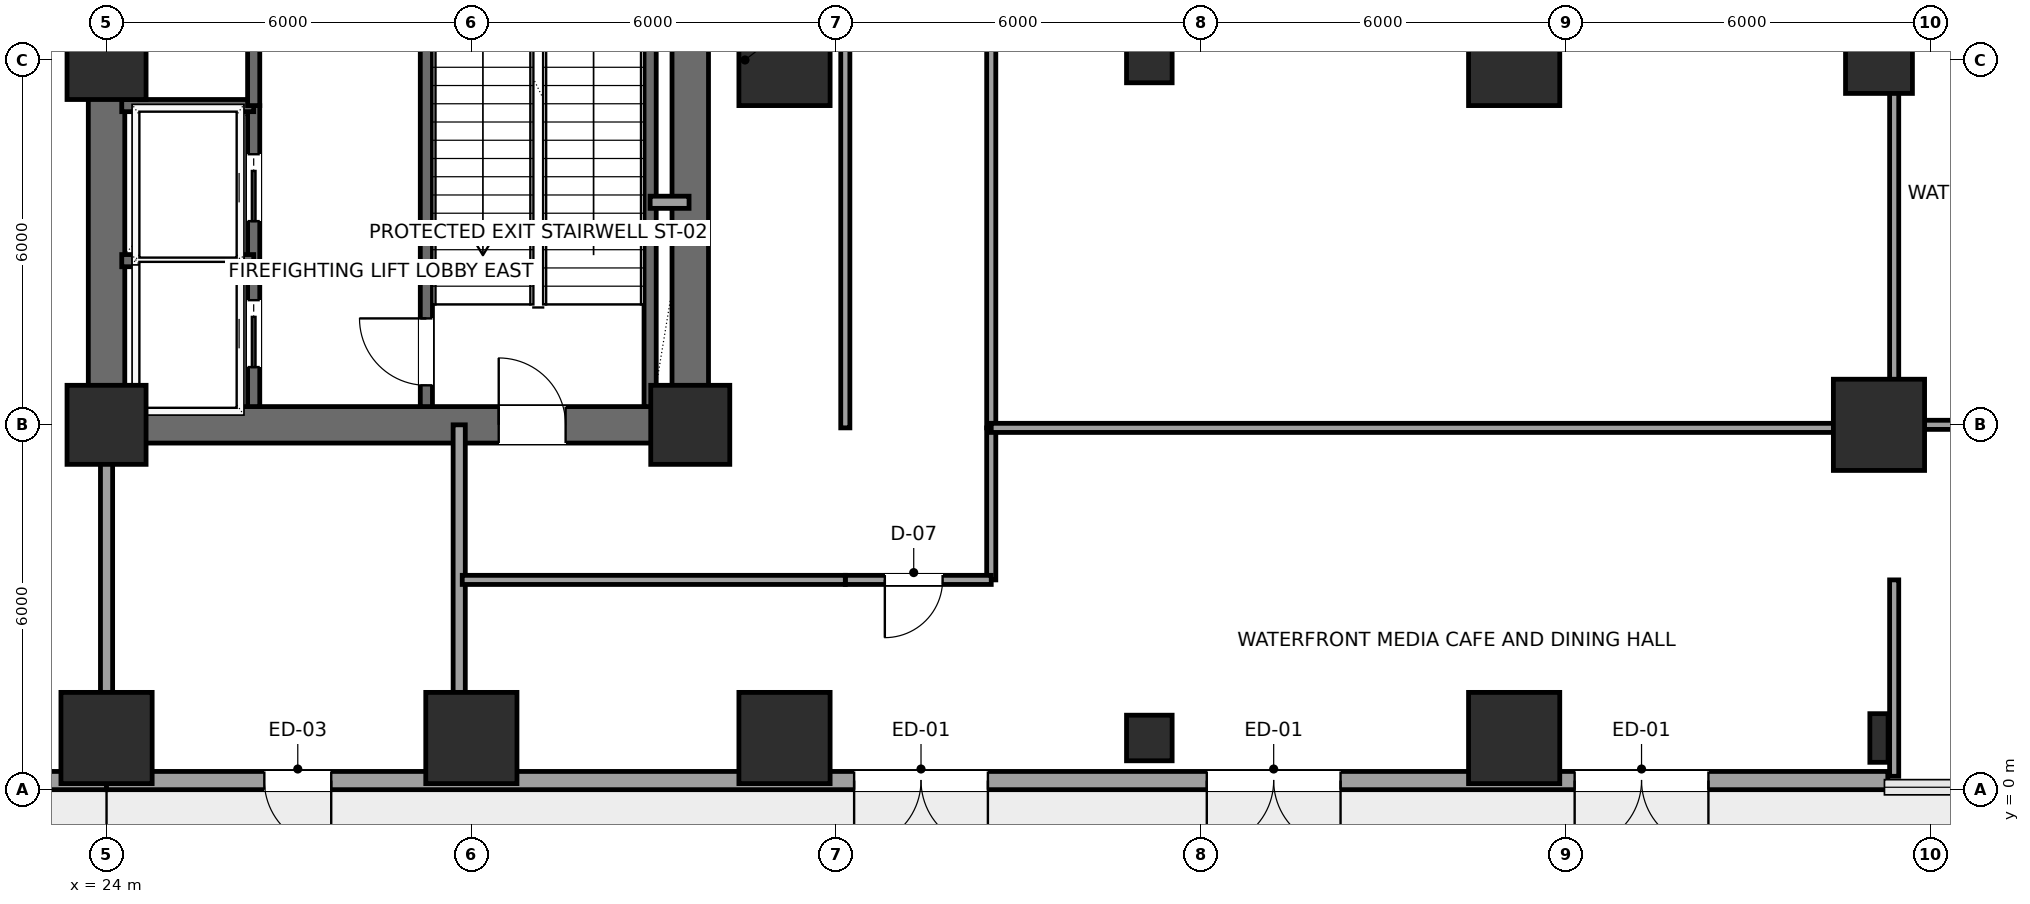
"""IFC4 building model, lengths in metres.
Left out: names, types, materials, properties, quantities, classifications, styles, units other than length and angle.
Written with IfcOpenShell. Run it as: python <this file> out.ifc"""

import sys

from ifc_helpers import new_model, si_unit, direction, frame, frame_2d, origin, origin_2d, place, context, subcontext, project, spatial, rectangle, hollow_rectangle, i_section, extrude, element, fill, save


model = new_model("IFC4")
c1 = context("Model", 3, precision=1e-05, world=origin(), true_north=direction((0.0, 1.0)))
c2 = subcontext(c1, "Body", "Model", "MODEL_VIEW")
j1 = project(units=[si_unit("LENGTHUNIT", "METRE"), si_unit("PLANEANGLEUNIT", "RADIAN")], contexts=[c1])
p1 = place(None, origin())
s1 = spatial("IfcSite", under=j1, at=p1, CompositionType="ELEMENT")
p2 = place(p1, origin())
s2 = spatial("IfcBuilding", under=s1, at=p2, CompositionType="ELEMENT")
p3 = place(p2, origin())
s3 = spatial("IfcBuildingStorey", under=s2, at=p3, CompositionType="ELEMENT", Elevation=0.0)
for number, where, z_axis, x_axis in (
    (1, (24.0, 6.0, 0.0), (0.0, 0.0, 1.0), (1.0, 0.0, 0.0)),
    (2, (24.0, 12.0, 0.0), (0.0, 0.0, 1.0), (1.0, 0.0, 0.0)),
    (3, (33.6, 6.0, 0.0), (0.0, 0.0, 1.0), (1.0, 0.0, 0.0)),
):
    element("IfcColumn", number, at=place(p3, frame(where, z_axis=z_axis, x_axis=x_axis)), inside=s3, PredefinedType="COLUMN", context=c2, shape_type="SweptSolid", body=[
        extrude(rectangle(XDim=1.3, YDim=1.3, at=origin_2d()), origin(), (0.0, 0.0, 1.0), 5.7),
    ])
for number, where, z_axis, x_axis in (
    (4, (24.0, 0.85, 0.0), (0.0, 0.0, 1.0), (1.0, 0.0, 0.0)),
    (5, (30.0, 0.85, 0.0), (0.0, 0.0, 1.0), (1.0, 0.0, 0.0)),
    (6, (35.15, 0.85, 0.0), (0.0, 0.0, 1.0), (1.0, 0.0, 0.0)),
    (7, (35.15, 12.0, 0.0), (0.0, 0.0, 1.0), (1.0, 0.0, 0.0)),
):
    element("IfcColumn", number, at=place(p3, frame(where, z_axis=z_axis, x_axis=x_axis)), inside=s3, PredefinedType="COLUMN", context=c2, shape_type="SweptSolid", body=[
        extrude(rectangle(XDim=1.5, YDim=1.5, at=origin_2d()), origin(), (0.0, 0.0, 1.0), 5.7),
    ])
for number, where, z_axis, x_axis in (
    (8, (41.15, 0.85, 0.0), (0.0, 0.0, 1.0), (1.0, 0.0, 0.0)),
    (9, (41.15, 12.0, 0.0), (0.0, 0.0, 1.0), (1.0, 0.0, 0.0)),
):
    element("IfcColumn", number, at=place(p3, frame(where, z_axis=z_axis, x_axis=x_axis)), inside=s3, PredefinedType="COLUMN", context=c2, shape_type="SweptSolid", body=[
        extrude(hollow_rectangle(XDim=0.75, YDim=0.75, WallThickness=0.035, InnerFilletRadius=0.035, OuterFilletRadius=0.05, at=origin_2d()), origin(), (0.0, 0.0, 1.0), 5.7),
    ])
for number, where, z_axis, x_axis in (
    (10, (47.15, 0.85, 0.0), (0.0, 0.0, 1.0), (1.0, 0.0, 0.0)),
    (11, (47.15, 12.0, 0.0), (0.0, 0.0, 1.0), (1.0, 0.0, 0.0)),
):
    element("IfcColumn", number, at=place(p3, frame(where, z_axis=z_axis, x_axis=x_axis)), inside=s3, PredefinedType="COLUMN", context=c2, shape_type="SweptSolid", body=[
        extrude(rectangle(XDim=1.5, YDim=1.5, at=origin_2d()), origin(), (0.0, 0.0, 1.0), 5.7),
    ])
p4 = place(p3, frame((53.15, 0.85, 0.0), z_axis=(0.0, 0.0, 1.0), x_axis=(1.0, 0.0, 0.0)))
e12 = element("IfcColumn", 12, at=p4, inside=s3, PredefinedType="COLUMN", context=c2, shape_type="SweptSolid", body=[
    extrude(i_section(OverallWidth=0.3, OverallDepth=0.8, WebThickness=0.018, FlangeThickness=0.033, FilletRadius=0.03, at=origin_2d()), origin(), (0.0, 0.0, 1.0), 5.7),
])
p5 = place(p3, frame((53.15, 6.0, 0.0), z_axis=(0.0, 0.0, 1.0), x_axis=(1.0, 0.0, 0.0)))
e13 = element("IfcColumn", 13, at=p5, inside=s3, PredefinedType="COLUMN", context=c2, shape_type="SweptSolid", body=[
    extrude(rectangle(XDim=1.5, YDim=1.5, at=origin_2d()), origin(), (0.0, 0.0, 1.0), 5.7),
])
p6 = place(p3, frame((53.15, 12.0, 0.0), z_axis=(0.0, 0.0, 1.0), x_axis=(1.0, 0.0, 0.0)))
e14 = element("IfcColumn", 14, at=p6, inside=s3, PredefinedType="COLUMN", context=c2, shape_type="SweptSolid", body=[
    extrude(rectangle(XDim=1.1, YDim=1.1, at=origin_2d()), origin(), (0.0, 0.0, 1.0), 5.7),
])
p7 = place(p3, frame((24.0, 0.15, 0.0), z_axis=(0.0, 0.0, 1.0), x_axis=(-1.0, 0.0, 0.0)))
e15 = element("IfcWall", 15, at=p7, inside=s3, PredefinedType="SOLIDWALL", context=c2, shape_type="SweptSolid", body=[
    extrude(rectangle(XDim=12.145, YDim=0.3, at=frame_2d((6.073, 0.0))), origin(), (0.0, 0.0, 1.0), 5.4),
])
p8 = place(p7, frame((1.9, 0.0, 0.0)))
e16 = element("IfcOpeningElement", 16, at=p8, cuts=e15, PredefinedType="OPENING", context=c2, shape_type="SweptSolid", body=[
    extrude(rectangle(XDim=2.2, YDim=2.6, at=frame_2d((1.1, 1.3))), frame((0.0, 0.16, 0.0), z_axis=(0.0, -1.0, 0.0), x_axis=(1.0, 0.0, 0.0)), (0.0, 0.0, 1.0), 0.32),
])
p9 = place(p7, frame((7.9, 0.0, 0.0)))
e17 = element("IfcOpeningElement", 17, at=p9, cuts=e15, PredefinedType="OPENING", context=c2, shape_type="SweptSolid", body=[
    extrude(rectangle(XDim=2.2, YDim=2.6, at=frame_2d((1.1, 1.3))), frame((0.0, 0.16, 0.0), z_axis=(0.0, -1.0, 0.0), x_axis=(1.0, 0.0, 0.0)), (0.0, 0.0, 1.0), 0.32),
])
p10 = place(p3, frame((53.295, 0.15, 0.0), z_axis=(0.0, 0.0, 1.0), x_axis=(-1.0, 0.0, 0.0)))
e18 = element("IfcWall", 18, at=p10, inside=s3, PredefinedType="SOLIDWALL", context=c2, shape_type="SweptSolid", body=[
    extrude(rectangle(XDim=29.295, YDim=0.3, at=frame_2d((14.647, 0.0))), origin(), (0.0, 0.0, 1.0), 5.4),
])
p11 = place(p10, frame((2.95, 0.0, 0.0)))
e19 = element("IfcOpeningElement", 19, at=p11, cuts=e18, PredefinedType="OPENING", context=c2, shape_type="SweptSolid", body=[
    extrude(rectangle(XDim=2.2, YDim=2.6, at=frame_2d((1.1, 1.3))), frame((0.0, 0.16, 0.0), z_axis=(0.0, -1.0, 0.0), x_axis=(1.0, 0.0, 0.0)), (0.0, 0.0, 1.0), 0.32),
])
p12 = place(p10, frame((9.0, 0.0, 0.0)))
e20 = element("IfcOpeningElement", 20, at=p12, cuts=e18, PredefinedType="OPENING", context=c2, shape_type="SweptSolid", body=[
    extrude(rectangle(XDim=2.2, YDim=2.6, at=frame_2d((1.1, 1.3))), frame((0.0, 0.16, 0.0), z_axis=(0.0, -1.0, 0.0), x_axis=(1.0, 0.0, 0.0)), (0.0, 0.0, 1.0), 0.32),
])
p13 = place(p10, frame((14.8, 0.0, 0.0)))
e21 = element("IfcOpeningElement", 21, at=p13, cuts=e18, PredefinedType="OPENING", context=c2, shape_type="SweptSolid", body=[
    extrude(rectangle(XDim=2.2, YDim=2.6, at=frame_2d((1.1, 1.3))), frame((0.0, 0.16, 0.0), z_axis=(0.0, -1.0, 0.0), x_axis=(1.0, 0.0, 0.0)), (0.0, 0.0, 1.0), 0.32),
])
p14 = place(p10, frame((25.6, 0.0, 0.0)))
e22 = element("IfcOpeningElement", 22, at=p14, cuts=e18, PredefinedType="OPENING", context=c2, shape_type="SweptSolid", body=[
    extrude(rectangle(XDim=1.1, YDim=2.2, at=frame_2d((0.55, 1.1))), frame((0.0, 0.16, 0.0), z_axis=(0.0, -1.0, 0.0), x_axis=(1.0, 0.0, 0.0)), (0.0, 0.0, 1.0), 0.32),
])
p15 = place(p3, frame((24.0, 6.0, 0.0), z_axis=(0.0, 0.0, 1.0), x_axis=(1.0, 0.0, 0.0)))
e23 = element("IfcWall", 23, at=p15, inside=s3, PredefinedType="SHEAR", context=c2, shape_type="SweptSolid", body=[
    extrude(rectangle(XDim=9.6, YDim=0.6, at=frame_2d((4.8, 0.0))), origin(), (0.0, 0.0, 1.0), 5.4),
])
p16 = place(p15, frame((6.45, 0.0, 0.0)))
e24 = element("IfcOpeningElement", 24, at=p16, cuts=e23, PredefinedType="OPENING", context=c2, shape_type="SweptSolid", body=[
    extrude(rectangle(XDim=1.1, YDim=2.2, at=frame_2d((0.55, 1.1))), frame((0.0, 0.31, 0.0), z_axis=(0.0, -1.0, 0.0), x_axis=(1.0, 0.0, 0.0)), (0.0, 0.0, 1.0), 0.62),
])
p17 = place(p3, frame((24.0, 6.0, 0.0), z_axis=(0.0, 0.0, 1.0), x_axis=(0.0, 1.0, 0.0)))
e25 = element("IfcWall", 25, at=p17, inside=s3, PredefinedType="SHEAR", context=c2, shape_type="SweptSolid", body=[
    extrude(rectangle(XDim=12.0, YDim=0.6, at=frame_2d((6.0, 0.0))), origin(), (0.0, 0.0, 1.0), 5.4),
])
p18 = place(p17, frame((7.15, 0.0, 0.0)))
e26 = element("IfcOpeningElement", 26, at=p18, cuts=e25, PredefinedType="OPENING", context=c2, shape_type="SweptSolid", body=[
    extrude(rectangle(XDim=1.6, YDim=2.3, at=frame_2d((0.8, 1.15))), frame((0.0, 0.31, 0.0), z_axis=(0.0, -1.0, 0.0), x_axis=(1.0, 0.0, 0.0)), (0.0, 0.0, 1.0), 0.62),
])
p19 = place(p3, frame((33.6, 6.0, 0.0), z_axis=(0.0, 0.0, 1.0), x_axis=(0.0, 1.0, 0.0)))
e27 = element("IfcWall", 27, at=p19, inside=s3, PredefinedType="SHEAR", context=c2, shape_type="SweptSolid", body=[
    extrude(rectangle(XDim=12.0, YDim=0.6, at=frame_2d((6.0, 0.0))), origin(), (0.0, 0.0, 1.0), 5.4),
])
p20 = place(p19, frame((10.2, 0.0, 0.0)))
e28 = element("IfcOpeningElement", 28, at=p20, cuts=e27, PredefinedType="OPENING", context=c2, shape_type="SweptSolid", body=[
    extrude(rectangle(XDim=0.9, YDim=2.15, at=frame_2d((0.45, 1.075))), frame((0.0, 0.31, 0.0), z_axis=(0.0, -1.0, 0.0), x_axis=(1.0, 0.0, 0.0)), (0.0, 0.0, 1.0), 0.62),
])
p21 = place(p3, frame((29.26, 6.3, 0.0), z_axis=(0.0, 0.0, 1.0), x_axis=(0.0, 1.0, 0.0)))
e29 = element("IfcWall", 29, at=p21, inside=s3, PredefinedType="SHEAR", context=c2, shape_type="SweptSolid", body=[
    extrude(rectangle(XDim=8.88, YDim=0.2, at=frame_2d((4.44, 0.0))), origin(), (0.0, 0.0, 1.0), 5.4),
])
p22 = place(p21, frame((0.35, 0.0, 0.0)))
e30 = element("IfcOpeningElement", 30, at=p22, cuts=e29, PredefinedType="OPENING", context=c2, shape_type="SweptSolid", body=[
    extrude(rectangle(XDim=1.1, YDim=2.2, at=frame_2d((0.55, 1.1))), frame((0.0, 0.11, 0.0), z_axis=(0.0, -1.0, 0.0), x_axis=(1.0, 0.0, 0.0)), (0.0, 0.0, 1.0), 0.22),
])
p23 = place(p3, frame((32.94, 6.3, 0.0), z_axis=(0.0, 0.0, 1.0), x_axis=(0.0, 1.0, 0.0)))
e31 = element("IfcWall", 31, at=p23, inside=s3, PredefinedType="SHEAR", context=c2, shape_type="SweptSolid", body=[
    extrude(rectangle(XDim=8.88, YDim=0.2, at=frame_2d((4.44, 0.0))), origin(), (0.0, 0.0, 1.0), 5.4),
])
p24 = place(p3, frame((26.42, 6.3, 0.0), z_axis=(0.0, 0.0, 1.0), x_axis=(0.0, 1.0, 0.0)))
e32 = element("IfcWall", 32, at=p24, inside=s3, PredefinedType="SHEAR", context=c2, shape_type="SweptSolid", body=[
    extrude(rectangle(XDim=4.95, YDim=0.2, at=frame_2d((2.475, 0.0))), origin(), (0.0, 0.0, 1.0), 5.4),
])
p25 = place(p24, frame((0.65, 0.0, 0.0)))
e33 = element("IfcOpeningElement", 33, at=p25, cuts=e32, PredefinedType="OPENING", context=c2, shape_type="SweptSolid", body=[
    extrude(rectangle(XDim=1.1, YDim=2.2, at=frame_2d((0.55, 1.1))), frame((0.0, 0.11, 0.0), z_axis=(0.0, -1.0, 0.0), x_axis=(1.0, 0.0, 0.0)), (0.0, 0.0, 1.0), 0.22),
])
p26 = place(p24, frame((3.05, 0.0, 0.0)))
e34 = element("IfcOpeningElement", 34, at=p26, cuts=e32, PredefinedType="OPENING", context=c2, shape_type="SweptSolid", body=[
    extrude(rectangle(XDim=1.1, YDim=2.2, at=frame_2d((0.55, 1.1))), frame((0.0, 0.11, 0.0), z_axis=(0.0, -1.0, 0.0), x_axis=(1.0, 0.0, 0.0)), (0.0, 0.0, 1.0), 0.22),
])
for number, where, z_axis, x_axis in (
    (35, (24.25, 8.7, 0.0), (0.0, 0.0, 1.0), (1.0, 0.0, 0.0)),
    (36, (24.25, 11.25, 0.0), (0.0, 0.0, 1.0), (1.0, 0.0, 0.0)),
):
    element("IfcWall", number, at=place(p3, frame(where, z_axis=z_axis, x_axis=x_axis)), inside=s3, PredefinedType="SHEAR", context=c2, shape_type="SweptSolid", body=[
        extrude(rectangle(XDim=2.17, YDim=0.2, at=frame_2d((1.085, 0.0))), origin(), (0.0, 0.0, 1.0), 5.4),
    ])
p27 = place(p3, frame((26.42, 11.25, 0.0), z_axis=(0.0, 0.0, 1.0), x_axis=(0.0, 1.0, 0.0)))
e37 = element("IfcWall", 37, at=p27, inside=s3, PredefinedType="SHEAR", context=c2, shape_type="SweptSolid", body=[
    extrude(rectangle(XDim=1.4, YDim=0.2, at=frame_2d((0.7, 0.0))), origin(), (0.0, 0.0, 1.0), 5.4),
])
p28 = place(p3, frame((32.94, 9.66, 0.0), z_axis=(0.0, 0.0, 1.0), x_axis=(1.0, 0.0, 0.0)))
e38 = element("IfcWall", 38, at=p28, inside=s3, PredefinedType="SOLIDWALL", context=c2, shape_type="SweptSolid", body=[
    extrude(rectangle(XDim=0.64, YDim=0.2, at=frame_2d((0.32, 0.0))), origin(), (0.0, 0.0, 1.0), 5.4),
])
p29 = place(p3, frame((24.0, 0.22, 0.0), z_axis=(0.0, 0.0, 1.0), x_axis=(0.0, 1.0, 0.0)))
e39 = element("IfcWall", 39, at=p29, inside=s3, PredefinedType="SOLIDWALL", context=c2, shape_type="SweptSolid", body=[
    extrude(rectangle(XDim=5.78, YDim=0.2, at=frame_2d((2.89, 0.0))), origin(), (0.0, 0.0, 1.0), 3.492),
])
p30 = place(p3, frame((29.8, 0.22, 0.0), z_axis=(0.0, 0.0, 1.0), x_axis=(0.0, 1.0, 0.0)))
e40 = element("IfcWall", 40, at=p30, inside=s3, PredefinedType="SOLIDWALL", context=c2, shape_type="SweptSolid", body=[
    extrude(rectangle(XDim=5.78, YDim=0.2, at=frame_2d((2.89, 0.0))), origin(), (0.0, 0.0, 1.0), 5.4),
])
p31 = place(p3, frame((36.15, 5.95, 0.0), z_axis=(0.0, 0.0, 1.0), x_axis=(0.0, 1.0, 0.0)))
e41 = element("IfcWall", 41, at=p31, inside=s3, PredefinedType="PARTITIONING", context=c2, shape_type="SweptSolid", body=[
    extrude(rectangle(XDim=9.93, YDim=0.15, at=frame_2d((4.965, 0.0))), origin(), (0.0, 0.0, 1.0), 5.4),
])
p32 = place(p3, frame((62.78, 6.0, 0.0), z_axis=(0.0, 0.0, 1.0), x_axis=(-1.0, 0.0, 0.0)))
e42 = element("IfcWall", 42, at=p32, inside=s3, PredefinedType="PARTITIONING", context=c2, shape_type="SweptSolid", body=[
    extrude(rectangle(XDim=9.38, YDim=0.15, at=frame_2d((4.69, 0.0))), origin(), (0.0, 0.0, 1.0), 5.4),
])
p33 = place(p3, frame((53.4, 6.0, 0.0), z_axis=(0.0, 0.0, 1.0), x_axis=(0.0, 1.0, 0.0)))
e43 = element("IfcWall", 43, at=p33, inside=s3, PredefinedType="PARTITIONING", context=c2, shape_type="SweptSolid", body=[
    extrude(rectangle(XDim=6.0, YDim=0.15, at=frame_2d((3.0, 0.0))), origin(), (0.0, 0.0, 1.0), 5.4),
])
p34 = place(p3, frame((53.4, 12.0, 0.0), z_axis=(0.0, 0.0, 1.0), x_axis=(0.0, 1.0, 0.0)))
e44 = element("IfcWall", 44, at=p34, inside=s3, PredefinedType="PARTITIONING", context=c2, shape_type="SweptSolid", body=[
    extrude(rectangle(XDim=1.65, YDim=0.15, at=frame_2d((0.825, 0.0))), origin(), (0.0, 0.0, 1.0), 5.4),
])
p35 = place(p3, frame((38.55, 23.64, 0.0), z_axis=(0.0, 0.0, 1.0), x_axis=(0.0, -1.0, 0.0)))
e45 = element("IfcWall", 45, at=p35, inside=s3, PredefinedType="PARTITIONING", context=c2, shape_type="SweptSolid", body=[
    extrude(rectangle(XDim=17.69, YDim=0.15, at=frame_2d((8.845, 0.0))), origin(), (0.0, 0.0, 1.0), 5.4),
])
p36 = place(p3, frame((38.55, 5.95, 0.0), z_axis=(0.0, 0.0, 1.0), x_axis=(0.0, -1.0, 0.0)))
e46 = element("IfcWall", 46, at=p36, inside=s3, PredefinedType="PARTITIONING", context=c2, shape_type="SweptSolid", body=[
    extrude(rectangle(XDim=2.5, YDim=0.15, at=frame_2d((1.25, 0.0))), origin(), (0.0, 0.0, 1.0), 5.4),
])
p37 = place(p3, frame((38.55, 3.45, 0.0), z_axis=(0.0, 0.0, 1.0), x_axis=(-1.0, 0.0, 0.0)))
e47 = element("IfcWall", 47, at=p37, inside=s3, PredefinedType="PARTITIONING", context=c2, shape_type="SweptSolid", body=[
    extrude(rectangle(XDim=2.4, YDim=0.15, at=frame_2d((1.2, 0.0))), origin(), (0.0, 0.0, 1.0), 4.792),
])
p38 = place(p37, frame((0.8, 0.0, 0.0)))
e48 = element("IfcOpeningElement", 48, at=p38, cuts=e47, PredefinedType="OPENING", context=c2, shape_type="SweptSolid", body=[
    extrude(rectangle(XDim=0.95, YDim=2.15, at=frame_2d((0.475, 1.075))), frame((0.0, 0.085, 0.0), z_axis=(0.0, -1.0, 0.0), x_axis=(1.0, 0.0, 0.0)), (0.0, 0.0, 1.0), 0.17),
])
p39 = place(p3, frame((36.15, 3.45, 0.0), z_axis=(0.0, 0.0, 1.0), x_axis=(-1.0, 0.0, 0.0)))
e49 = element("IfcWall", 49, at=p39, inside=s3, PredefinedType="PARTITIONING", context=c2, shape_type="SweptSolid", body=[
    extrude(rectangle(XDim=6.3, YDim=0.15, at=frame_2d((3.15, 0.0))), origin(), (0.0, 0.0, 1.0), 4.792),
])
p40 = place(p3, frame((53.4, 0.22, 0.0), z_axis=(0.0, 0.0, 1.0), x_axis=(0.0, 1.0, 0.0)))
e50 = element("IfcWall", 50, at=p40, inside=s3, PredefinedType="PARTITIONING", context=c2, shape_type="SweptSolid", body=[
    extrude(rectangle(XDim=3.23, YDim=0.15, at=frame_2d((1.615, 0.0))), origin(), (0.0, 0.0, 1.0), 4.742),
])
p41 = place(p3, frame((38.55, 5.95, 0.0), z_axis=(0.0, 0.0, 1.0), x_axis=(1.0, 0.0, 0.0)))
e51 = element("IfcWall", 51, at=p41, inside=s3, PredefinedType="PARTITIONING", context=c2, shape_type="SweptSolid", body=[
    extrude(rectangle(XDim=14.85, YDim=0.15, at=frame_2d((7.425, 0.0))), origin(), (0.0, 0.0, 1.0), 5.4),
])
p42 = place(p11, origin())
e52 = element("IfcDoor", 52, at=p42, inside=s3, OperationType="DOUBLE_DOOR_SINGLE_SWING", PredefinedType="DOOR", context=c2, shape_type="SweptSolid", body=[
    extrude(rectangle(XDim=2.2, YDim=2.6, at=frame_2d((1.1, 1.3))), frame((0.0, 0.025, 0.0), z_axis=(0.0, -1.0, 0.0), x_axis=(1.0, 0.0, 0.0)), (0.0, 0.0, 1.0), 0.05),
])
fill(e19, e52)
p43 = place(p12, origin())
e53 = element("IfcDoor", 53, at=p43, inside=s3, OperationType="DOUBLE_DOOR_SINGLE_SWING", PredefinedType="DOOR", context=c2, shape_type="SweptSolid", body=[
    extrude(rectangle(XDim=2.2, YDim=2.6, at=frame_2d((1.1, 1.3))), frame((0.0, 0.025, 0.0), z_axis=(0.0, -1.0, 0.0), x_axis=(1.0, 0.0, 0.0)), (0.0, 0.0, 1.0), 0.05),
])
fill(e20, e53)
p44 = place(p13, origin())
e54 = element("IfcDoor", 54, at=p44, inside=s3, OperationType="DOUBLE_DOOR_SINGLE_SWING", PredefinedType="DOOR", context=c2, shape_type="SweptSolid", body=[
    extrude(rectangle(XDim=2.2, YDim=2.6, at=frame_2d((1.1, 1.3))), frame((0.0, 0.025, 0.0), z_axis=(0.0, -1.0, 0.0), x_axis=(1.0, 0.0, 0.0)), (0.0, 0.0, 1.0), 0.05),
])
fill(e21, e54)
p45 = place(p14, origin())
e55 = element("IfcDoor", 55, at=p45, inside=s3, OperationType="SINGLE_SWING_LEFT", PredefinedType="DOOR", context=c2, shape_type="SweptSolid", body=[
    extrude(rectangle(XDim=1.1, YDim=2.2, at=frame_2d((0.55, 1.1))), frame((0.0, 0.025, 0.0), z_axis=(0.0, -1.0, 0.0), x_axis=(1.0, 0.0, 0.0)), (0.0, 0.0, 1.0), 0.05),
])
fill(e22, e55)
p46 = place(p16, origin())
e56 = element("IfcDoor", 56, at=p46, inside=s3, OperationType="SINGLE_SWING_LEFT", PredefinedType="DOOR", context=c2, shape_type="SweptSolid", body=[
    extrude(rectangle(XDim=1.1, YDim=2.2, at=frame_2d((0.55, 1.1))), frame((0.0, 0.025, 0.0), z_axis=(0.0, -1.0, 0.0), x_axis=(1.0, 0.0, 0.0)), (0.0, 0.0, 1.0), 0.05),
])
fill(e24, e56)
p47 = place(p22, origin())
e57 = element("IfcDoor", 57, at=p47, inside=s3, OperationType="SINGLE_SWING_RIGHT", PredefinedType="DOOR", context=c2, shape_type="SweptSolid", body=[
    extrude(rectangle(XDim=1.1, YDim=2.2, at=frame_2d((0.55, 1.1))), frame((0.0, 0.025, 0.0), z_axis=(0.0, -1.0, 0.0), x_axis=(1.0, 0.0, 0.0)), (0.0, 0.0, 1.0), 0.05),
])
fill(e30, e57)
p48 = place(p25, origin())
e58 = element("IfcDoor", 58, at=p48, inside=s3, OperationType="SLIDING_TO_LEFT", PredefinedType="DOOR", context=c2, shape_type="SweptSolid", body=[
    extrude(rectangle(XDim=1.1, YDim=2.2, at=frame_2d((0.55, 1.1))), frame((0.0, 0.025, 0.0), z_axis=(0.0, -1.0, 0.0), x_axis=(1.0, 0.0, 0.0)), (0.0, 0.0, 1.0), 0.05),
])
fill(e33, e58)
p49 = place(p26, origin())
e59 = element("IfcDoor", 59, at=p49, inside=s3, OperationType="SLIDING_TO_LEFT", PredefinedType="DOOR", context=c2, shape_type="SweptSolid", body=[
    extrude(rectangle(XDim=1.1, YDim=2.2, at=frame_2d((0.55, 1.1))), frame((0.0, 0.025, 0.0), z_axis=(0.0, -1.0, 0.0), x_axis=(1.0, 0.0, 0.0)), (0.0, 0.0, 1.0), 0.05),
])
fill(e34, e59)
p50 = place(p38, origin())
e60 = element("IfcDoor", 60, at=p50, inside=s3, OperationType="SINGLE_SWING_RIGHT", PredefinedType="DOOR", context=c2, shape_type="SweptSolid", body=[
    extrude(rectangle(XDim=0.95, YDim=2.15, at=frame_2d((0.475, 1.075))), frame((0.0, 0.025, 0.0), z_axis=(0.0, -1.0, 0.0), x_axis=(1.0, 0.0, 0.0)), (0.0, 0.0, 1.0), 0.05),
])
fill(e48, e60)
save(model, sys.argv[1])
